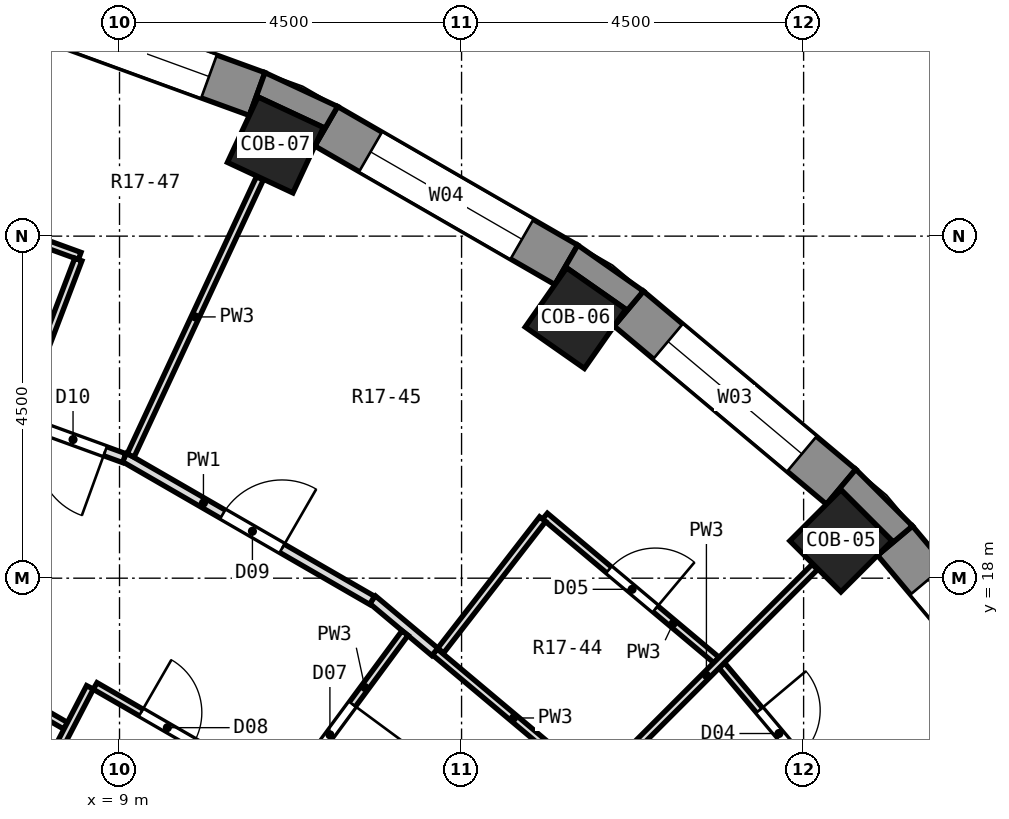
"""IFC4 building model, lengths in metres.
Left out: names, types, materials, properties, quantities, classifications, styles, units other than length and angle.
Written with IfcOpenShell. Run it as: python <this file> out.ifc"""

import sys

from ifc_helpers import new_model, si_unit, direction, frame, frame_2d, origin, origin_2d, place, context, subcontext, project, spatial, polyline, rectangle, outline, extrude, element, fill, save


model = new_model("IFC4")
c1 = context("Model", 3, precision=1e-05, world=origin(), true_north=direction((0.0, 1.0)))
c2 = subcontext(c1, "Body", "Model", "MODEL_VIEW")
j1 = project(units=[si_unit("LENGTHUNIT", "METRE"), si_unit("PLANEANGLEUNIT", "RADIAN")], contexts=[c1])
p1 = place(None, origin())
s1 = spatial("IfcSite", under=j1, at=p1, CompositionType="ELEMENT")
p2 = place(p1, origin())
s2 = spatial("IfcBuilding", under=s1, at=p2, CompositionType="ELEMENT")
p3 = place(p2, frame((0.0, 0.0, 91.9)))
s3 = spatial("IfcBuildingStorey", under=s2, at=p3, CompositionType="ELEMENT", Elevation=91.9)
for number, where, z_axis, x_axis in (
    (1, (18.491, 18.491, 0.0), (0.0, 0.0, 1.0), (0.707, 0.707, 0.0)),
    (2, (14.999, 21.421, 0.0), (0.0, 0.0, 1.0), (0.574, 0.819, 0.0)),
    (3, (11.052, 23.7, 0.0), (0.0, 0.0, 1.0), (0.423, 0.906, 0.0)),
):
    element("IfcColumn", number, at=place(p3, frame(where, z_axis=z_axis, x_axis=x_axis)), inside=s3, PredefinedType="COLUMN", context=c2, shape_type="SweptSolid", body=[
        extrude(rectangle(XDim=0.95, YDim=0.95, at=origin_2d()), origin(), (0.0, 0.0, 1.0), 3.3),
    ])
p4 = place(p3, frame((21.547, 15.699, 0.0), z_axis=(0.0, 0.0, 1.0), x_axis=(-0.642774476932, 0.766055462616, 0.0)))
e4 = element("IfcWall", 4, at=p4, inside=s3, PredefinedType="SOLIDWALL", context=c2, shape_type="SweptSolid", body=[
    extrude(rectangle(XDim=3.648, YDim=0.6, at=frame_2d((1.824, 0.0))), origin(), (0.0, 0.0, 1.0), 2.8),
])
p5 = place(p4, frame((0.674, 0.0, 0.9)))
e5 = element("IfcOpeningElement", 5, at=p5, cuts=e4, PredefinedType="OPENING", context=c2, shape_type="SweptSolid", body=[
    extrude(rectangle(XDim=2.3, YDim=1.8, at=frame_2d((1.15, 0.9))), frame((0.0, 0.312, 0.0), z_axis=(0.0, -1.0, 0.0), x_axis=(1.0, 0.0, 0.0)), (0.0, 0.0, 1.0), 0.624),
])
p6 = place(p3, frame((18.494, 19.202, 0.0), z_axis=(0.0, 0.0, 1.0), x_axis=(-0.766055462616, 0.642774476932, 0.0)))
e6 = element("IfcWall", 6, at=p6, inside=s3, PredefinedType="SOLIDWALL", context=c2, shape_type="SweptSolid", body=[
    extrude(rectangle(XDim=3.648, YDim=0.6, at=frame_2d((1.824, 0.0))), origin(), (0.0, 0.0, 1.0), 2.8),
])
p7 = place(p6, frame((0.674, 0.0, 0.9)))
e7 = element("IfcOpeningElement", 7, at=p7, cuts=e6, PredefinedType="OPENING", context=c2, shape_type="SweptSolid", body=[
    extrude(rectangle(XDim=2.3, YDim=1.8, at=frame_2d((1.15, 0.9))), frame((0.0, 0.312, 0.0), z_axis=(0.0, -1.0, 0.0), x_axis=(1.0, 0.0, 0.0)), (0.0, 0.0, 1.0), 0.624),
])
p8 = place(p3, frame((14.878, 22.122, 0.0), z_axis=(0.0, 0.0, 1.0), x_axis=(-0.866051847062, 0.499954196102, 0.0)))
e8 = element("IfcWall", 8, at=p8, inside=s3, PredefinedType="SOLIDWALL", context=c2, shape_type="SweptSolid", body=[
    extrude(rectangle(XDim=3.648, YDim=0.6, at=frame_2d((1.824, 0.0))), origin(), (0.0, 0.0, 1.0), 2.8),
])
p9 = place(p8, frame((0.674, 0.0, 0.9)))
e9 = element("IfcOpeningElement", 9, at=p9, cuts=e8, PredefinedType="OPENING", context=c2, shape_type="SweptSolid", body=[
    extrude(rectangle(XDim=2.3, YDim=1.8, at=frame_2d((1.15, 0.9))), frame((0.0, 0.312, 0.0), z_axis=(0.0, -1.0, 0.0), x_axis=(1.0, 0.0, 0.0)), (0.0, 0.0, 1.0), 0.624),
])
p10 = place(p3, frame((10.811, 24.369, 0.0), z_axis=(0.0, 0.0, 1.0), x_axis=(-0.939703505393, 0.341990236633, 0.0)))
e10 = element("IfcWall", 10, at=p10, inside=s3, PredefinedType="SOLIDWALL", context=c2, shape_type="SweptSolid", body=[
    extrude(rectangle(XDim=3.648, YDim=0.6, at=frame_2d((1.824, 0.0))), origin(), (0.0, 0.0, 1.0), 2.8),
])
p11 = place(p10, frame((0.674, 0.0, 0.9)))
e11 = element("IfcOpeningElement", 11, at=p11, cuts=e10, PredefinedType="OPENING", context=c2, shape_type="SweptSolid", body=[
    extrude(rectangle(XDim=2.3, YDim=1.8, at=frame_2d((1.15, 0.9))), frame((0.0, 0.312, 0.0), z_axis=(0.0, -1.0, 0.0), x_axis=(1.0, 0.0, 0.0)), (0.0, 0.0, 1.0), 0.624),
])
p12 = place(p3, origin())
e12 = element("IfcWall", 12, at=p12, inside=s3, PredefinedType="SOLIDWALL", context=c2, shape_type="SweptSolid", body=[
    extrude(outline(polyline([(19.432, 18.686), (18.686, 19.432), (18.301, 18.972), (18.491, 19.163), (19.163, 18.491), (18.972, 18.301), (19.432, 18.686)])), origin(), (0.0, 0.0, 1.0), 2.8),
])
p13 = place(p3, origin())
e13 = element("IfcWall", 13, at=p13, inside=s3, PredefinedType="SOLIDWALL", context=c2, shape_type="SweptSolid", body=[
    extrude(outline(polyline([(15.028, 22.382), (14.728, 21.862), (14.882, 22.083), (15.661, 21.538), (15.506, 21.317), (15.892, 21.777), (15.028, 22.382)])), origin(), (0.0, 0.0, 1.0), 2.8),
])
p14 = place(p3, origin())
e14 = element("IfcWall", 14, at=p14, inside=s3, PredefinedType="SOLIDWALL", context=c2, shape_type="SweptSolid", body=[
    extrude(outline(polyline([(10.913, 24.651), (10.708, 24.087), (10.822, 24.331), (11.683, 23.93), (11.569, 23.686), (11.869, 24.206), (10.913, 24.651)])), origin(), (0.0, 0.0, 1.0), 2.8),
])
p15 = place(p3, frame((16.923, 16.853, 0.0), z_axis=(0.0, 0.0, 1.0), x_axis=(0.642942941421, -0.765914077477, 0.0)))
e15 = element("IfcWall", 15, at=p15, inside=s3, PredefinedType="PARTITIONING", context=c2, shape_type="SweptSolid", body=[
    extrude(rectangle(XDim=2.39, YDim=0.1, at=frame_2d((1.195, 0.0))), origin(), (0.0, 0.0, 1.0), 2.8),
])
p16 = place(p15, frame((0.77, 0.0, 0.0)))
e16 = element("IfcOpeningElement", 16, at=p16, cuts=e15, PredefinedType="OPENING", context=c2, shape_type="SweptSolid", body=[
    extrude(rectangle(XDim=0.8, YDim=2.1, at=frame_2d((0.4, 1.05))), frame((0.0, 0.062, 0.0), z_axis=(0.0, -1.0, 0.0), x_axis=(1.0, 0.0, 0.0)), (0.0, 0.0, 1.0), 0.124),
])
p17 = place(p3, frame((13.149, 17.03, 0.0), z_axis=(0.0, 0.0, 1.0), x_axis=(0.766003631775, -0.642836243617, 0.0)))
e17 = element("IfcWall", 17, at=p17, inside=s3, PredefinedType="PARTITIONING", context=c2, shape_type="SweptSolid", body=[
    extrude(rectangle(XDim=2.704, YDim=0.1, at=frame_2d((1.352, 0.0))), origin(), (0.0, 0.0, 1.0), 2.8),
])
p18 = place(p3, frame((12.328, 17.718, 0.0), z_axis=(0.0, 0.0, 1.0), x_axis=(0.766311067441, -0.642469725292, 0.0)))
e18 = element("IfcWall", 18, at=p18, inside=s3, PredefinedType="PARTITIONING", context=c2, shape_type="SweptSolid", body=[
    extrude(rectangle(XDim=1.071, YDim=0.125, at=frame_2d((0.535, 0.0))), origin(), (0.0, 0.0, 1.0), 2.8),
])
p19 = place(p3, frame((14.597, 18.816, 0.0), z_axis=(0.0, 0.0, 1.0), x_axis=(0.766055897741, -0.642773958353, 0.0)))
e19 = element("IfcWall", 19, at=p19, inside=s3, PredefinedType="PARTITIONING", context=c2, shape_type="SweptSolid", body=[
    extrude(rectangle(XDim=2.945, YDim=0.1, at=frame_2d((1.472, 0.0))), origin(), (0.0, 0.0, 1.0), 2.8),
])
p20 = place(p19, frame((1.097, 0.0, 0.0)))
e20 = element("IfcOpeningElement", 20, at=p20, cuts=e19, PredefinedType="OPENING", context=c2, shape_type="SweptSolid", body=[
    extrude(rectangle(XDim=0.8, YDim=2.1, at=frame_2d((0.4, 1.05))), frame((0.0, 0.062, 0.0), z_axis=(0.0, -1.0, 0.0), x_axis=(1.0, 0.0, 0.0)), (0.0, 0.0, 1.0), 0.124),
])
p21 = place(p3, frame((7.614, 16.449, 0.0), z_axis=(0.0, 0.0, 1.0), x_axis=(0.866201164306, -0.499695450205, 0.0)))
e21 = element("IfcWall", 21, at=p21, inside=s3, PredefinedType="PARTITIONING", context=c2, shape_type="SweptSolid", body=[
    extrude(rectangle(XDim=0.783, YDim=0.1, at=frame_2d((0.391, 0.0))), origin(), (0.0, 0.0, 1.0), 2.8),
])
p22 = place(p3, frame((8.679, 16.582, 0.0), z_axis=(0.0, 0.0, 1.0), x_axis=(0.866122264928, -0.499832194037, 0.0)))
e22 = element("IfcWall", 22, at=p22, inside=s3, PredefinedType="PARTITIONING", context=c2, shape_type="SweptSolid", body=[
    extrude(rectangle(XDim=2.247, YDim=0.1, at=frame_2d((1.124, 0.0))), origin(), (0.0, 0.0, 1.0), 2.8),
])
p23 = place(p22, frame((0.698, 0.0, 0.0)))
e23 = element("IfcOpeningElement", 23, at=p23, cuts=e22, PredefinedType="OPENING", context=c2, shape_type="SweptSolid", body=[
    extrude(rectangle(XDim=0.8, YDim=2.1, at=frame_2d((0.4, 1.05))), frame((0.0, 0.062, 0.0), z_axis=(0.0, -1.0, 0.0), x_axis=(1.0, 0.0, 0.0)), (0.0, 0.0, 1.0), 0.124),
])
p24 = place(p3, frame((9.065, 19.59, 0.0), z_axis=(0.0, 0.0, 1.0), x_axis=(0.865961876044, -0.500110017135, 0.0)))
e24 = element("IfcWall", 24, at=p24, inside=s3, PredefinedType="PARTITIONING", context=c2, shape_type="SweptSolid", body=[
    extrude(rectangle(XDim=3.762, YDim=0.125, at=frame_2d((1.881, 0.0))), origin(), (0.0, 0.0, 1.0), 2.8),
])
p25 = place(p24, frame((1.494, 0.0, 0.0)))
e25 = element("IfcOpeningElement", 25, at=p25, cuts=e24, PredefinedType="OPENING", context=c2, shape_type="SweptSolid", body=[
    extrude(rectangle(XDim=0.9, YDim=2.1, at=frame_2d((0.45, 1.05))), frame((0.0, 0.074, 0.0), z_axis=(0.0, -1.0, 0.0), x_axis=(1.0, 0.0, 0.0)), (0.0, 0.0, 1.0), 0.149),
])
p26 = place(p3, frame((7.704, 20.073, 0.0), z_axis=(0.0, 0.0, 1.0), x_axis=(0.939763804893, -0.341824503237, 0.0)))
e26 = element("IfcWall", 26, at=p26, inside=s3, PredefinedType="PARTITIONING", context=c2, shape_type="SweptSolid", body=[
    extrude(rectangle(XDim=1.444, YDim=0.125, at=frame_2d((0.722, 0.0))), origin(), (0.0, 0.0, 1.0), 2.8),
])
p27 = place(p26, frame((0.278, 0.0, 0.0)))
e27 = element("IfcOpeningElement", 27, at=p27, cuts=e26, PredefinedType="OPENING", context=c2, shape_type="SweptSolid", body=[
    extrude(rectangle(XDim=0.9, YDim=2.1, at=frame_2d((0.45, 1.05))), frame((0.0, 0.074, 0.0), z_axis=(0.0, -1.0, 0.0), x_axis=(1.0, 0.0, 0.0)), (0.0, 0.0, 1.0), 0.149),
])
p28 = place(p3, frame((6.23, 23.057, 0.0), z_axis=(0.0, 0.0, 1.0), x_axis=(0.939644231496, -0.342153062556, 0.0)))
e28 = element("IfcWall", 28, at=p28, inside=s3, PredefinedType="PARTITIONING", context=c2, shape_type="SweptSolid", body=[
    extrude(rectangle(XDim=2.39, YDim=0.1, at=frame_2d((1.195, 0.0))), origin(), (0.0, 0.0, 1.0), 2.8),
])
p29 = place(p28, frame((0.77, 0.0, 0.0)))
e29 = element("IfcOpeningElement", 29, at=p29, cuts=e28, PredefinedType="OPENING", context=c2, shape_type="SweptSolid", body=[
    extrude(rectangle(XDim=0.8, YDim=2.1, at=frame_2d((0.4, 1.05))), frame((0.0, 0.062, 0.0), z_axis=(0.0, -1.0, 0.0), x_axis=(1.0, 0.0, 0.0)), (0.0, 0.0, 1.0), 0.124),
])
p30 = place(p3, frame((15.294, 15.294, 0.0), z_axis=(0.0, 0.0, 1.0), x_axis=(0.707106781187, 0.707106781187, 0.0)))
e30 = element("IfcWall", 30, at=p30, inside=s3, PredefinedType="PARTITIONING", context=c2, shape_type="SweptSolid", body=[
    extrude(rectangle(XDim=4.035, YDim=0.1, at=frame_2d((2.018, 0.0))), origin(), (0.0, 0.0, 1.0), 2.8),
])
p31 = place(p3, frame((13.225, 17.047, 0.0), z_axis=(0.0, 0.0, 1.0), x_axis=(0.612827784587, 0.790216493398, 0.0)))
e31 = element("IfcWall", 31, at=p31, inside=s3, PredefinedType="PARTITIONING", context=c2, shape_type="SweptSolid", body=[
    extrude(rectangle(XDim=2.188, YDim=0.1, at=frame_2d((1.094, 0.0))), origin(), (0.0, 0.0, 1.0), 2.8),
])
p32 = place(p3, frame((10.773, 14.591, 0.0), z_axis=(0.0, 0.0, 1.0), x_axis=(0.593899624956, 0.804539144776, 0.0)))
e32 = element("IfcWall", 32, at=p32, inside=s3, PredefinedType="PARTITIONING", context=c2, shape_type="SweptSolid", body=[
    extrude(rectangle(XDim=3.339, YDim=0.1, at=frame_2d((1.669, 0.0))), origin(), (0.0, 0.0, 1.0), 2.8),
])
p33 = place(p32, frame((1.176, 0.0, 0.0)))
e33 = element("IfcOpeningElement", 33, at=p33, cuts=e32, PredefinedType="OPENING", context=c2, shape_type="SweptSolid", body=[
    extrude(rectangle(XDim=1.0, YDim=2.1, at=frame_2d((0.5, 1.05))), frame((0.0, 0.062, 0.0), z_axis=(0.0, -1.0, 0.0), x_axis=(1.0, 0.0, 0.0)), (0.0, 0.0, 1.0), 0.124),
])
p34 = place(p3, frame((7.694, 14.8, 0.0), z_axis=(0.0, 0.0, 1.0), x_axis=(0.461012435149, 0.887393675117, 0.0)))
e34 = element("IfcWall", 34, at=p34, inside=s3, PredefinedType="PARTITIONING", context=c2, shape_type="SweptSolid", body=[
    extrude(rectangle(XDim=1.988, YDim=0.1, at=frame_2d((0.994, 0.0))), origin(), (0.0, 0.0, 1.0), 2.8),
])
p35 = place(p3, frame((9.146, 19.615, 0.0), z_axis=(0.0, 0.0, 1.0), x_axis=(0.422622950513, 0.906305600612, 0.0)))
e35 = element("IfcWall", 35, at=p35, inside=s3, PredefinedType="PARTITIONING", context=c2, shape_type="SweptSolid", body=[
    extrude(rectangle(XDim=4.022, YDim=0.1, at=frame_2d((2.011, 0.0))), origin(), (0.0, 0.0, 1.0), 2.8),
])
p36 = place(p3, frame((7.679, 20.149, 0.0), z_axis=(0.0, 0.0, 1.0), x_axis=(0.356134598474, 0.93443466747, 0.0)))
e36 = element("IfcWall", 36, at=p36, inside=s3, PredefinedType="PARTITIONING", context=c2, shape_type="SweptSolid", body=[
    extrude(rectangle(XDim=2.187, YDim=0.1, at=frame_2d((1.093, 0.0))), origin(), (0.0, 0.0, 1.0), 2.8),
])
p37 = place(p5, origin())
e37 = element("IfcWindow", 37, at=p37, inside=s3, PartitioningType="SINGLE_PANEL", PredefinedType="WINDOW", context=c2, shape_type="SweptSolid", body=[
    extrude(rectangle(XDim=2.3, YDim=1.8, at=frame_2d((1.15, 0.9))), frame((0.0, 0.18, 0.0), z_axis=(0.0, -1.0, 0.0), x_axis=(1.0, 0.0, 0.0)), (0.0, 0.0, 1.0), 0.06),
])
fill(e5, e37)
p38 = place(p7, origin())
e38 = element("IfcWindow", 38, at=p38, inside=s3, PartitioningType="SINGLE_PANEL", PredefinedType="WINDOW", context=c2, shape_type="SweptSolid", body=[
    extrude(rectangle(XDim=2.3, YDim=1.8, at=frame_2d((1.15, 0.9))), frame((0.0, 0.18, 0.0), z_axis=(0.0, -1.0, 0.0), x_axis=(1.0, 0.0, 0.0)), (0.0, 0.0, 1.0), 0.06),
])
fill(e7, e38)
p39 = place(p9, origin())
e39 = element("IfcWindow", 39, at=p39, inside=s3, PartitioningType="SINGLE_PANEL", PredefinedType="WINDOW", context=c2, shape_type="SweptSolid", body=[
    extrude(rectangle(XDim=2.3, YDim=1.8, at=frame_2d((1.15, 0.9))), frame((0.0, 0.18, 0.0), z_axis=(0.0, -1.0, 0.0), x_axis=(1.0, 0.0, 0.0)), (0.0, 0.0, 1.0), 0.06),
])
fill(e9, e39)
p40 = place(p11, origin())
e40 = element("IfcWindow", 40, at=p40, inside=s3, PartitioningType="SINGLE_PANEL", PredefinedType="WINDOW", context=c2, shape_type="SweptSolid", body=[
    extrude(rectangle(XDim=2.3, YDim=1.8, at=frame_2d((1.15, 0.9))), frame((0.0, 0.18, 0.0), z_axis=(0.0, -1.0, 0.0), x_axis=(1.0, 0.0, 0.0)), (0.0, 0.0, 1.0), 0.06),
])
fill(e11, e40)
p41 = place(p16, origin())
e41 = element("IfcDoor", 41, at=p41, inside=s3, OperationType="SINGLE_SWING_LEFT", PredefinedType="DOOR", context=c2, shape_type="SweptSolid", body=[
    extrude(rectangle(XDim=0.8, YDim=2.1, at=frame_2d((0.4, 1.05))), frame((0.0, 0.025, 0.0), z_axis=(0.0, -1.0, 0.0), x_axis=(1.0, 0.0, 0.0)), (0.0, 0.0, 1.0), 0.05),
])
fill(e16, e41)
p42 = place(p20, origin())
e42 = element("IfcDoor", 42, at=p42, inside=s3, OperationType="SINGLE_SWING_RIGHT", PredefinedType="DOOR", context=c2, shape_type="SweptSolid", body=[
    extrude(rectangle(XDim=0.8, YDim=2.1, at=frame_2d((0.4, 1.05))), frame((0.0, 0.025, 0.0), z_axis=(0.0, -1.0, 0.0), x_axis=(1.0, 0.0, 0.0)), (0.0, 0.0, 1.0), 0.05),
])
fill(e20, e42)
p43 = place(p33, frame((1.0, 0.0, 0.0), z_axis=(0.0, 0.0, 1.0), x_axis=(-1.0, 0.0, 0.0)))
e43 = element("IfcDoor", 43, at=p43, inside=s3, OperationType="SINGLE_SWING_LEFT", PredefinedType="DOOR", context=c2, shape_type="SweptSolid", body=[
    extrude(rectangle(XDim=1.0, YDim=2.1, at=frame_2d((0.5, 1.05))), frame((0.0, 0.025, 0.0), z_axis=(0.0, -1.0, 0.0), x_axis=(1.0, 0.0, 0.0)), (0.0, 0.0, 1.0), 0.05),
])
fill(e33, e43)
p44 = place(p23, origin())
e44 = element("IfcDoor", 44, at=p44, inside=s3, OperationType="SINGLE_SWING_LEFT", PredefinedType="DOOR", context=c2, shape_type="SweptSolid", body=[
    extrude(rectangle(XDim=0.8, YDim=2.1, at=frame_2d((0.4, 1.05))), frame((0.0, 0.025, 0.0), z_axis=(0.0, -1.0, 0.0), x_axis=(1.0, 0.0, 0.0)), (0.0, 0.0, 1.0), 0.05),
])
fill(e23, e44)
p45 = place(p25, origin())
e45 = element("IfcDoor", 45, at=p45, inside=s3, OperationType="SINGLE_SWING_RIGHT", PredefinedType="DOOR", context=c2, shape_type="SweptSolid", body=[
    extrude(rectangle(XDim=0.9, YDim=2.1, at=frame_2d((0.45, 1.05))), frame((0.0, 0.025, 0.0), z_axis=(0.0, -1.0, 0.0), x_axis=(1.0, 0.0, 0.0)), (0.0, 0.0, 1.0), 0.05),
])
fill(e25, e45)
p46 = place(p27, frame((0.9, 0.0, 0.0), z_axis=(0.0, 0.0, 1.0), x_axis=(-1.0, 0.0, 0.0)))
e46 = element("IfcDoor", 46, at=p46, inside=s3, OperationType="SINGLE_SWING_LEFT", PredefinedType="DOOR", context=c2, shape_type="SweptSolid", body=[
    extrude(rectangle(XDim=0.9, YDim=2.1, at=frame_2d((0.45, 1.05))), frame((0.0, 0.025, 0.0), z_axis=(0.0, -1.0, 0.0), x_axis=(1.0, 0.0, 0.0)), (0.0, 0.0, 1.0), 0.05),
])
fill(e27, e46)
save(model, sys.argv[1])
